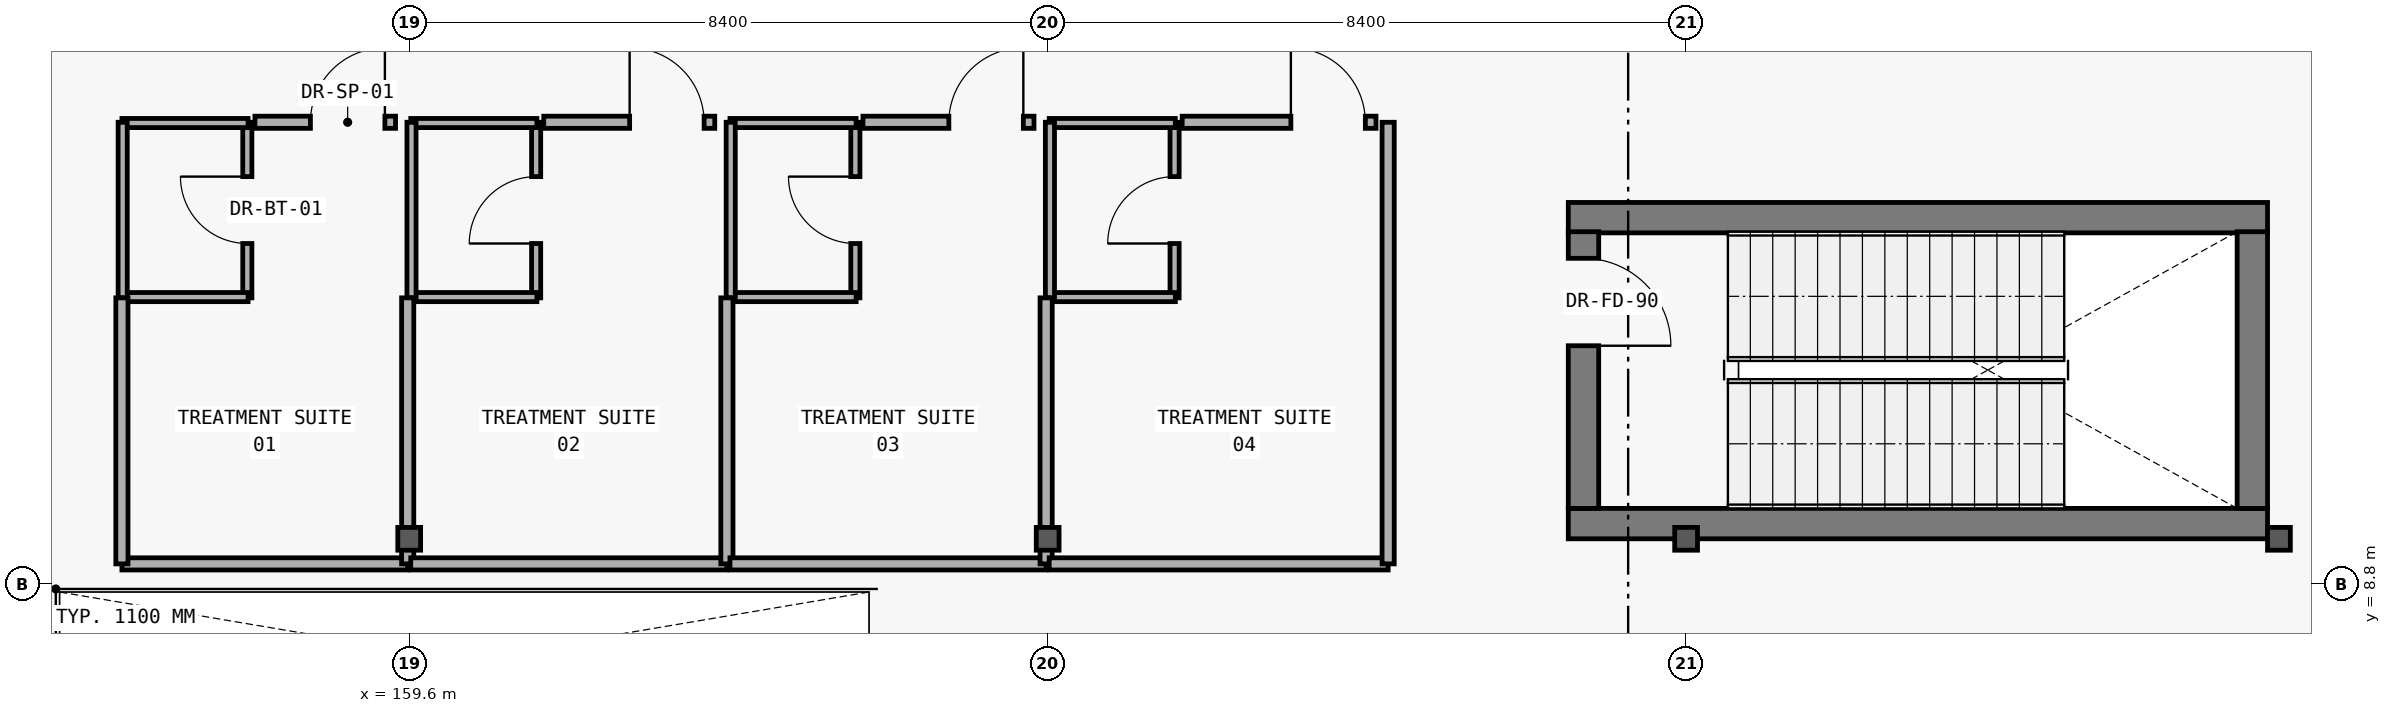
"""IFC4 building model, lengths in metres.
Left out: names, types, materials, properties, quantities, classifications, styles, units other than length and angle.
Written with IfcOpenShell. Run it as: python <this file> out.ifc"""

import sys

from ifc_helpers import new_model, si_unit, direction, frame, frame_2d, origin, origin_2d, place, context, subcontext, project, spatial, rectangle, i_section, extrude, element, fill, save


model = new_model("IFC4")
c1 = context("Model", 3, precision=1e-05, world=origin(), true_north=direction((0.0, 1.0)))
c2 = subcontext(c1, "Body", "Model", "MODEL_VIEW")
j1 = project(units=[si_unit("LENGTHUNIT", "METRE"), si_unit("PLANEANGLEUNIT", "RADIAN")], contexts=[c1])
p1 = place(None, origin())
s1 = spatial("IfcSite", under=j1, at=p1, CompositionType="ELEMENT")
p2 = place(p1, origin())
s2 = spatial("IfcBuilding", under=s1, at=p2, CompositionType="ELEMENT")
p3 = place(p2, frame((0.0, 0.0, 5.4)))
s3 = spatial("IfcBuildingStorey", under=s2, at=p3, CompositionType="ELEMENT", Elevation=5.4)
for number, where, z_axis, x_axis in (
    (1, (159.6, 9.4, 0.0), (0.0, 0.0, 1.0), (1.0, 0.0, 0.0)),
    (2, (168.0, 9.4, 0.0), (0.0, 0.0, 1.0), (1.0, 0.0, 0.0)),
    (3, (176.4, 9.4, 0.0), (0.0, 0.0, 1.0), (1.0, 0.0, 0.0)),
    (4, (184.2, 9.4, 0.0), (0.0, 0.0, 1.0), (1.0, 0.0, 0.0)),
):
    element("IfcColumn", number, at=place(p3, frame(where, z_axis=z_axis, x_axis=x_axis)), inside=s3, PredefinedType="COLUMN", context=c2, shape_type="SweptSolid", body=[
        extrude(i_section(OverallWidth=0.3, OverallDepth=0.3, WebThickness=0.011, FlangeThickness=0.019, at=origin_2d()), origin(), (0.0, 0.0, 1.0), 5.4),
    ])
for number, where, z_axis, x_axis in (
    (5, (174.85, 9.6, 0.0), (0.0, 0.0, 1.0), (1.0, 0.0, 0.0)),
    (6, (184.05, 13.625, 0.0), (0.0, 0.0, 1.0), (-1.0, 0.0, 0.0)),
):
    element("IfcWall", number, at=place(p3, frame(where, z_axis=z_axis, x_axis=x_axis)), inside=s3, PredefinedType="SHEAR", context=c2, shape_type="SweptSolid", body=[
        extrude(rectangle(XDim=9.2, YDim=0.4, at=frame_2d((4.6, 0.0))), origin(), (0.0, 0.0, 1.0), 5.08),
    ])
p4 = place(p3, frame((175.05, 13.44, 0.0), z_axis=(0.0, 0.0, 1.0), x_axis=(0.0, -1.0, 0.0)))
e7 = element("IfcWall", 7, at=p4, inside=s3, PredefinedType="SHEAR", context=c2, shape_type="SweptSolid", body=[
    extrude(rectangle(XDim=3.64, YDim=0.4, at=frame_2d((1.82, 0.0))), origin(), (0.0, 0.0, 1.0), 5.08),
])
p5 = place(p4, frame((0.35, 0.0, 0.0)))
e8 = element("IfcOpeningElement", 8, at=p5, cuts=e7, PredefinedType="OPENING", context=c2, shape_type="SweptSolid", body=[
    extrude(rectangle(XDim=1.15, YDim=2.2, at=frame_2d((0.575, 1.1))), frame((0.0, 0.21, 0.0), z_axis=(0.0, -1.0, 0.0), x_axis=(1.0, 0.0, 0.0)), (0.0, 0.0, 1.0), 0.42),
])
p6 = place(p3, frame((183.85, 9.8, 0.0), z_axis=(0.0, 0.0, 1.0), x_axis=(0.0, 1.0, 0.0)))
e9 = element("IfcWall", 9, at=p6, inside=s3, PredefinedType="SHEAR", context=c2, shape_type="SweptSolid", body=[
    extrude(rectangle(XDim=3.64, YDim=0.4, at=frame_2d((1.82, 0.0))), origin(), (0.0, 0.0, 1.0), 5.08),
])
p7 = place(p3, frame((157.47, 12.57, 0.0), z_axis=(0.0, 0.0, 1.0), x_axis=(0.0, 1.0, 0.0)))
e10 = element("IfcWall", 10, at=p7, inside=s3, PredefinedType="PARTITIONING", context=c2, shape_type="SweptSolid", body=[
    extrude(rectangle(XDim=2.31, YDim=0.12, at=frame_2d((1.155, 0.0))), origin(), (0.0, 0.0, 1.0), 4.18),
])
p8 = place(p7, frame((0.715, 0.0, 0.0)))
e11 = element("IfcOpeningElement", 11, at=p8, cuts=e10, PredefinedType="OPENING", context=c2, shape_type="SweptSolid", body=[
    extrude(rectangle(XDim=0.88, YDim=2.15, at=frame_2d((0.44, 1.075))), frame((0.0, 0.07, 0.0), z_axis=(0.0, -1.0, 0.0), x_axis=(1.0, 0.0, 0.0)), (0.0, 0.0, 1.0), 0.14),
])
p9 = place(p3, frame((161.27, 12.57, 0.0), z_axis=(0.0, 0.0, 1.0), x_axis=(0.0, 1.0, 0.0)))
e12 = element("IfcWall", 12, at=p9, inside=s3, PredefinedType="PARTITIONING", context=c2, shape_type="SweptSolid", body=[
    extrude(rectangle(XDim=2.31, YDim=0.12, at=frame_2d((1.155, 0.0))), origin(), (0.0, 0.0, 1.0), 4.18),
])
p10 = place(p9, frame((0.715, 0.0, 0.0)))
e13 = element("IfcOpeningElement", 13, at=p10, cuts=e12, PredefinedType="OPENING", context=c2, shape_type="SweptSolid", body=[
    extrude(rectangle(XDim=0.88, YDim=2.15, at=frame_2d((0.44, 1.075))), frame((0.0, 0.07, 0.0), z_axis=(0.0, -1.0, 0.0), x_axis=(1.0, 0.0, 0.0)), (0.0, 0.0, 1.0), 0.14),
])
p11 = place(p3, frame((165.47, 12.57, 0.0), z_axis=(0.0, 0.0, 1.0), x_axis=(0.0, 1.0, 0.0)))
e14 = element("IfcWall", 14, at=p11, inside=s3, PredefinedType="PARTITIONING", context=c2, shape_type="SweptSolid", body=[
    extrude(rectangle(XDim=2.31, YDim=0.12, at=frame_2d((1.155, 0.0))), origin(), (0.0, 0.0, 1.0), 4.18),
])
p12 = place(p11, frame((0.715, 0.0, 0.0)))
e15 = element("IfcOpeningElement", 15, at=p12, cuts=e14, PredefinedType="OPENING", context=c2, shape_type="SweptSolid", body=[
    extrude(rectangle(XDim=0.88, YDim=2.15, at=frame_2d((0.44, 1.075))), frame((0.0, 0.07, 0.0), z_axis=(0.0, -1.0, 0.0), x_axis=(1.0, 0.0, 0.0)), (0.0, 0.0, 1.0), 0.14),
])
p13 = place(p3, frame((169.67, 12.57, 0.0), z_axis=(0.0, 0.0, 1.0), x_axis=(0.0, 1.0, 0.0)))
e16 = element("IfcWall", 16, at=p13, inside=s3, PredefinedType="PARTITIONING", context=c2, shape_type="SweptSolid", body=[
    extrude(rectangle(XDim=2.31, YDim=0.12, at=frame_2d((1.155, 0.0))), origin(), (0.0, 0.0, 1.0), 4.18),
])
p14 = place(p13, frame((0.715, 0.0, 0.0)))
e17 = element("IfcOpeningElement", 17, at=p14, cuts=e16, PredefinedType="OPENING", context=c2, shape_type="SweptSolid", body=[
    extrude(rectangle(XDim=0.88, YDim=2.15, at=frame_2d((0.44, 1.075))), frame((0.0, 0.07, 0.0), z_axis=(0.0, -1.0, 0.0), x_axis=(1.0, 0.0, 0.0)), (0.0, 0.0, 1.0), 0.14),
])
p15 = place(p3, frame((157.57, 14.88, 0.0), z_axis=(0.0, 0.0, 1.0), x_axis=(1.0, 0.0, 0.0)))
e18 = element("IfcWall", 18, at=p15, inside=s3, PredefinedType="PARTITIONING", context=c2, shape_type="SweptSolid", body=[
    extrude(rectangle(XDim=1.85, YDim=0.16, at=frame_2d((0.925, 0.0))), origin(), (0.0, 0.0, 1.0), 4.18),
])
p16 = place(p15, frame((0.73, 0.0, 0.0)))
e19 = element("IfcOpeningElement", 19, at=p16, cuts=e18, PredefinedType="OPENING", context=c2, shape_type="SweptSolid", body=[
    extrude(rectangle(XDim=0.98, YDim=2.2, at=frame_2d((0.49, 1.1))), frame((0.0, 0.09, 0.0), z_axis=(0.0, -1.0, 0.0), x_axis=(1.0, 0.0, 0.0)), (0.0, 0.0, 1.0), 0.18),
])
p17 = place(p3, frame((161.37, 14.88, 0.0), z_axis=(0.0, 0.0, 1.0), x_axis=(1.0, 0.0, 0.0)))
e20 = element("IfcWall", 20, at=p17, inside=s3, PredefinedType="PARTITIONING", context=c2, shape_type="SweptSolid", body=[
    extrude(rectangle(XDim=2.25, YDim=0.16, at=frame_2d((1.125, 0.0))), origin(), (0.0, 0.0, 1.0), 4.18),
])
p18 = place(p17, frame((1.13, 0.0, 0.0)))
e21 = element("IfcOpeningElement", 21, at=p18, cuts=e20, PredefinedType="OPENING", context=c2, shape_type="SweptSolid", body=[
    extrude(rectangle(XDim=0.98, YDim=2.2, at=frame_2d((0.49, 1.1))), frame((0.0, 0.09, 0.0), z_axis=(0.0, -1.0, 0.0), x_axis=(1.0, 0.0, 0.0)), (0.0, 0.0, 1.0), 0.18),
])
p19 = place(p3, frame((165.57, 14.88, 0.0), z_axis=(0.0, 0.0, 1.0), x_axis=(1.0, 0.0, 0.0)))
e22 = element("IfcWall", 22, at=p19, inside=s3, PredefinedType="PARTITIONING", context=c2, shape_type="SweptSolid", body=[
    extrude(rectangle(XDim=2.25, YDim=0.16, at=frame_2d((1.125, 0.0))), origin(), (0.0, 0.0, 1.0), 4.18),
])
p20 = place(p19, frame((1.13, 0.0, 0.0)))
e23 = element("IfcOpeningElement", 23, at=p20, cuts=e22, PredefinedType="OPENING", context=c2, shape_type="SweptSolid", body=[
    extrude(rectangle(XDim=0.98, YDim=2.2, at=frame_2d((0.49, 1.1))), frame((0.0, 0.09, 0.0), z_axis=(0.0, -1.0, 0.0), x_axis=(1.0, 0.0, 0.0)), (0.0, 0.0, 1.0), 0.18),
])
p21 = place(p3, frame((169.77, 14.88, 0.0), z_axis=(0.0, 0.0, 1.0), x_axis=(1.0, 0.0, 0.0)))
e24 = element("IfcWall", 24, at=p21, inside=s3, PredefinedType="PARTITIONING", context=c2, shape_type="SweptSolid", body=[
    extrude(rectangle(XDim=2.55, YDim=0.16, at=frame_2d((1.275, 0.0))), origin(), (0.0, 0.0, 1.0), 4.18),
])
p22 = place(p21, frame((1.43, 0.0, 0.0)))
e25 = element("IfcOpeningElement", 25, at=p22, cuts=e24, PredefinedType="OPENING", context=c2, shape_type="SweptSolid", body=[
    extrude(rectangle(XDim=0.98, YDim=2.2, at=frame_2d((0.49, 1.1))), frame((0.0, 0.09, 0.0), z_axis=(0.0, -1.0, 0.0), x_axis=(1.0, 0.0, 0.0)), (0.0, 0.0, 1.0), 0.18),
])
for number, where, z_axis, x_axis in (
    (26, (155.82, 12.58, 0.0), (0.0, 0.0, 1.0), (1.0, 0.0, 0.0)),
    (27, (155.82, 14.87, 0.0), (0.0, 0.0, 1.0), (1.0, 0.0, 0.0)),
):
    element("IfcWall", number, at=place(p3, frame(where, z_axis=z_axis, x_axis=x_axis)), inside=s3, PredefinedType="PARTITIONING", context=c2, shape_type="SweptSolid", body=[
        extrude(rectangle(XDim=1.66, YDim=0.12, at=frame_2d((0.83, 0.0))), origin(), (0.0, 0.0, 1.0), 4.18),
    ])
p23 = place(p3, frame((155.83, 12.57, 0.0), z_axis=(0.0, 0.0, 1.0), x_axis=(0.0, 1.0, 0.0)))
e28 = element("IfcWall", 28, at=p23, inside=s3, PredefinedType="PARTITIONING", context=c2, shape_type="SweptSolid", body=[
    extrude(rectangle(XDim=2.31, YDim=0.12, at=frame_2d((1.155, 0.0))), origin(), (0.0, 0.0, 1.0), 4.18),
])
for number, where, z_axis, x_axis in (
    (29, (159.62, 12.58, 0.0), (0.0, 0.0, 1.0), (1.0, 0.0, 0.0)),
    (30, (159.62, 14.87, 0.0), (0.0, 0.0, 1.0), (1.0, 0.0, 0.0)),
):
    element("IfcWall", number, at=place(p3, frame(where, z_axis=z_axis, x_axis=x_axis)), inside=s3, PredefinedType="PARTITIONING", context=c2, shape_type="SweptSolid", body=[
        extrude(rectangle(XDim=1.66, YDim=0.12, at=frame_2d((0.83, 0.0))), origin(), (0.0, 0.0, 1.0), 4.18),
    ])
p24 = place(p3, frame((159.63, 12.57, 0.0), z_axis=(0.0, 0.0, 1.0), x_axis=(0.0, 1.0, 0.0)))
e31 = element("IfcWall", 31, at=p24, inside=s3, PredefinedType="PARTITIONING", context=c2, shape_type="SweptSolid", body=[
    extrude(rectangle(XDim=2.31, YDim=0.12, at=frame_2d((1.155, 0.0))), origin(), (0.0, 0.0, 1.0), 4.18),
])
for number, where, z_axis, x_axis in (
    (32, (163.82, 12.58, 0.0), (0.0, 0.0, 1.0), (1.0, 0.0, 0.0)),
    (33, (163.82, 14.87, 0.0), (0.0, 0.0, 1.0), (1.0, 0.0, 0.0)),
):
    element("IfcWall", number, at=place(p3, frame(where, z_axis=z_axis, x_axis=x_axis)), inside=s3, PredefinedType="PARTITIONING", context=c2, shape_type="SweptSolid", body=[
        extrude(rectangle(XDim=1.66, YDim=0.12, at=frame_2d((0.83, 0.0))), origin(), (0.0, 0.0, 1.0), 4.18),
    ])
p25 = place(p3, frame((163.83, 12.57, 0.0), z_axis=(0.0, 0.0, 1.0), x_axis=(0.0, 1.0, 0.0)))
e34 = element("IfcWall", 34, at=p25, inside=s3, PredefinedType="PARTITIONING", context=c2, shape_type="SweptSolid", body=[
    extrude(rectangle(XDim=2.31, YDim=0.12, at=frame_2d((1.155, 0.0))), origin(), (0.0, 0.0, 1.0), 4.18),
])
for number, where, z_axis, x_axis in (
    (35, (168.02, 12.58, 0.0), (0.0, 0.0, 1.0), (1.0, 0.0, 0.0)),
    (36, (168.02, 14.87, 0.0), (0.0, 0.0, 1.0), (1.0, 0.0, 0.0)),
):
    element("IfcWall", number, at=place(p3, frame(where, z_axis=z_axis, x_axis=x_axis)), inside=s3, PredefinedType="PARTITIONING", context=c2, shape_type="SweptSolid", body=[
        extrude(rectangle(XDim=1.66, YDim=0.12, at=frame_2d((0.83, 0.0))), origin(), (0.0, 0.0, 1.0), 4.18),
    ])
p26 = place(p3, frame((168.03, 12.57, 0.0), z_axis=(0.0, 0.0, 1.0), x_axis=(0.0, 1.0, 0.0)))
e37 = element("IfcWall", 37, at=p26, inside=s3, PredefinedType="PARTITIONING", context=c2, shape_type="SweptSolid", body=[
    extrude(rectangle(XDim=2.31, YDim=0.12, at=frame_2d((1.155, 0.0))), origin(), (0.0, 0.0, 1.0), 4.18),
])
p27 = place(p3, frame((155.82, 9.07, 0.0), z_axis=(0.0, 0.0, 1.0), x_axis=(1.0, 0.0, 0.0)))
e38 = element("IfcWall", 38, at=p27, inside=s3, PredefinedType="PARTITIONING", context=c2, shape_type="SweptSolid", body=[
    extrude(rectangle(XDim=3.76, YDim=0.16, at=frame_2d((1.88, 0.0))), origin(), (0.0, 0.0, 1.0), 4.18),
])
for number, where, z_axis, x_axis in (
    (39, (155.82, 9.07, 0.0), (0.0, 0.0, 1.0), (0.0, 1.0, 0.0)),
    (40, (159.58, 9.07, 0.0), (0.0, 0.0, 1.0), (0.0, 1.0, 0.0)),
):
    element("IfcWall", number, at=place(p3, frame(where, z_axis=z_axis, x_axis=x_axis)), inside=s3, PredefinedType="PARTITIONING", context=c2, shape_type="SweptSolid", body=[
        extrude(rectangle(XDim=3.5, YDim=0.16, at=frame_2d((1.75, 0.0))), origin(), (0.0, 0.0, 1.0), 4.18),
    ])
p28 = place(p3, frame((159.62, 9.07, 0.0), z_axis=(0.0, 0.0, 1.0), x_axis=(1.0, 0.0, 0.0)))
e41 = element("IfcWall", 41, at=p28, inside=s3, PredefinedType="PARTITIONING", context=c2, shape_type="SweptSolid", body=[
    extrude(rectangle(XDim=4.16, YDim=0.16, at=frame_2d((2.08, 0.0))), origin(), (0.0, 0.0, 1.0), 4.18),
])
p29 = place(p3, frame((163.78, 9.07, 0.0), z_axis=(0.0, 0.0, 1.0), x_axis=(0.0, 1.0, 0.0)))
e42 = element("IfcWall", 42, at=p29, inside=s3, PredefinedType="PARTITIONING", context=c2, shape_type="SweptSolid", body=[
    extrude(rectangle(XDim=3.5, YDim=0.16, at=frame_2d((1.75, 0.0))), origin(), (0.0, 0.0, 1.0), 4.18),
])
p30 = place(p3, frame((163.82, 9.07, 0.0), z_axis=(0.0, 0.0, 1.0), x_axis=(1.0, 0.0, 0.0)))
e43 = element("IfcWall", 43, at=p30, inside=s3, PredefinedType="PARTITIONING", context=c2, shape_type="SweptSolid", body=[
    extrude(rectangle(XDim=4.16, YDim=0.16, at=frame_2d((2.08, 0.0))), origin(), (0.0, 0.0, 1.0), 4.18),
])
p31 = place(p3, frame((167.98, 9.07, 0.0), z_axis=(0.0, 0.0, 1.0), x_axis=(0.0, 1.0, 0.0)))
e44 = element("IfcWall", 44, at=p31, inside=s3, PredefinedType="PARTITIONING", context=c2, shape_type="SweptSolid", body=[
    extrude(rectangle(XDim=3.5, YDim=0.16, at=frame_2d((1.75, 0.0))), origin(), (0.0, 0.0, 1.0), 4.18),
])
p32 = place(p3, frame((168.02, 9.07, 0.0), z_axis=(0.0, 0.0, 1.0), x_axis=(1.0, 0.0, 0.0)))
e45 = element("IfcWall", 45, at=p32, inside=s3, PredefinedType="PARTITIONING", context=c2, shape_type="SweptSolid", body=[
    extrude(rectangle(XDim=4.46, YDim=0.16, at=frame_2d((2.23, 0.0))), origin(), (0.0, 0.0, 1.0), 4.18),
])
p33 = place(p3, frame((172.48, 9.07, 0.0), z_axis=(0.0, 0.0, 1.0), x_axis=(0.0, 1.0, 0.0)))
e46 = element("IfcWall", 46, at=p33, inside=s3, PredefinedType="PARTITIONING", context=c2, shape_type="SweptSolid", body=[
    extrude(rectangle(XDim=5.81, YDim=0.16, at=frame_2d((2.905, 0.0))), origin(), (0.0, 0.0, 1.0), 4.18),
])
p34 = place(p5, origin())
e47 = element("IfcDoor", 47, at=p34, inside=s3, OperationType="SINGLE_SWING_RIGHT", PredefinedType="DOOR", context=c2, shape_type="SweptSolid", body=[
    extrude(rectangle(XDim=1.15, YDim=2.2, at=frame_2d((0.575, 1.1))), frame((0.0, 0.025, 0.0), z_axis=(0.0, -1.0, 0.0), x_axis=(1.0, 0.0, 0.0)), (0.0, 0.0, 1.0), 0.05),
])
fill(e8, e47)
p35 = place(p8, origin())
e48 = element("IfcDoor", 48, at=p35, inside=s3, OperationType="SINGLE_SWING_RIGHT", PredefinedType="DOOR", context=c2, shape_type="SweptSolid", body=[
    extrude(rectangle(XDim=0.88, YDim=2.15, at=frame_2d((0.44, 1.075))), frame((0.0, 0.025, 0.0), z_axis=(0.0, -1.0, 0.0), x_axis=(1.0, 0.0, 0.0)), (0.0, 0.0, 1.0), 0.05),
])
fill(e11, e48)
p36 = place(p10, origin())
e49 = element("IfcDoor", 49, at=p36, inside=s3, OperationType="SINGLE_SWING_LEFT", PredefinedType="DOOR", context=c2, shape_type="SweptSolid", body=[
    extrude(rectangle(XDim=0.88, YDim=2.15, at=frame_2d((0.44, 1.075))), frame((0.0, 0.025, 0.0), z_axis=(0.0, -1.0, 0.0), x_axis=(1.0, 0.0, 0.0)), (0.0, 0.0, 1.0), 0.05),
])
fill(e13, e49)
p37 = place(p12, origin())
e50 = element("IfcDoor", 50, at=p37, inside=s3, OperationType="SINGLE_SWING_RIGHT", PredefinedType="DOOR", context=c2, shape_type="SweptSolid", body=[
    extrude(rectangle(XDim=0.88, YDim=2.15, at=frame_2d((0.44, 1.075))), frame((0.0, 0.025, 0.0), z_axis=(0.0, -1.0, 0.0), x_axis=(1.0, 0.0, 0.0)), (0.0, 0.0, 1.0), 0.05),
])
fill(e15, e50)
p38 = place(p14, origin())
e51 = element("IfcDoor", 51, at=p38, inside=s3, OperationType="SINGLE_SWING_LEFT", PredefinedType="DOOR", context=c2, shape_type="SweptSolid", body=[
    extrude(rectangle(XDim=0.88, YDim=2.15, at=frame_2d((0.44, 1.075))), frame((0.0, 0.025, 0.0), z_axis=(0.0, -1.0, 0.0), x_axis=(1.0, 0.0, 0.0)), (0.0, 0.0, 1.0), 0.05),
])
fill(e17, e51)
p39 = place(p16, origin())
e52 = element("IfcDoor", 52, at=p39, inside=s3, OperationType="SINGLE_SWING_RIGHT", PredefinedType="DOOR", context=c2, shape_type="SweptSolid", body=[
    extrude(rectangle(XDim=0.98, YDim=2.2, at=frame_2d((0.49, 1.1))), frame((0.0, 0.025, 0.0), z_axis=(0.0, -1.0, 0.0), x_axis=(1.0, 0.0, 0.0)), (0.0, 0.0, 1.0), 0.05),
])
fill(e19, e52)
p40 = place(p18, origin())
e53 = element("IfcDoor", 53, at=p40, inside=s3, OperationType="SINGLE_SWING_LEFT", PredefinedType="DOOR", context=c2, shape_type="SweptSolid", body=[
    extrude(rectangle(XDim=0.98, YDim=2.2, at=frame_2d((0.49, 1.1))), frame((0.0, 0.025, 0.0), z_axis=(0.0, -1.0, 0.0), x_axis=(1.0, 0.0, 0.0)), (0.0, 0.0, 1.0), 0.05),
])
fill(e21, e53)
p41 = place(p20, origin())
e54 = element("IfcDoor", 54, at=p41, inside=s3, OperationType="SINGLE_SWING_RIGHT", PredefinedType="DOOR", context=c2, shape_type="SweptSolid", body=[
    extrude(rectangle(XDim=0.98, YDim=2.2, at=frame_2d((0.49, 1.1))), frame((0.0, 0.025, 0.0), z_axis=(0.0, -1.0, 0.0), x_axis=(1.0, 0.0, 0.0)), (0.0, 0.0, 1.0), 0.05),
])
fill(e23, e54)
p42 = place(p22, origin())
e55 = element("IfcDoor", 55, at=p42, inside=s3, OperationType="SINGLE_SWING_LEFT", PredefinedType="DOOR", context=c2, shape_type="SweptSolid", body=[
    extrude(rectangle(XDim=0.98, YDim=2.2, at=frame_2d((0.49, 1.1))), frame((0.0, 0.025, 0.0), z_axis=(0.0, -1.0, 0.0), x_axis=(1.0, 0.0, 0.0)), (0.0, 0.0, 1.0), 0.05),
])
fill(e25, e55)
save(model, sys.argv[1])
